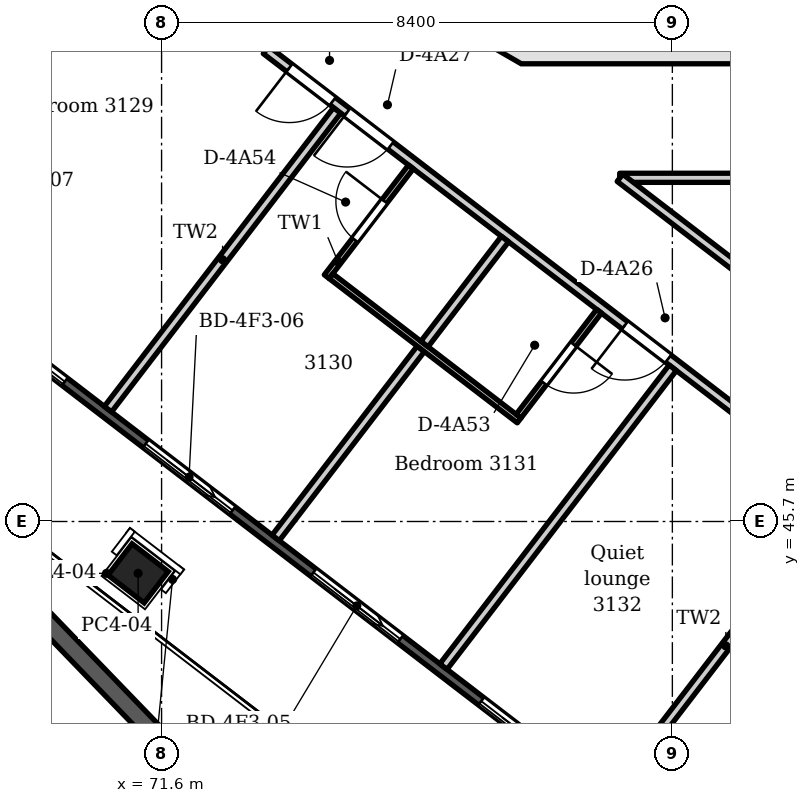
"""IFC4 building model, lengths in metres.
Left out: names, types, materials, properties, quantities, classifications, styles, units other than length and angle.
Written with IfcOpenShell. Run it as: python <this file> out.ifc"""

import sys

from ifc_helpers import new_model, si_unit, direction, frame, frame_2d, origin, origin_2d, place, context, subcontext, project, spatial, polyline, rectangle, outline, extrude, element, fill, save


model = new_model("IFC4")
c1 = context("Model", 3, precision=1e-05, world=origin(), true_north=direction((0.0, 1.0)))
c2 = subcontext(c1, "Body", "Model", "MODEL_VIEW")
j1 = project(units=[si_unit("LENGTHUNIT", "METRE"), si_unit("PLANEANGLEUNIT", "RADIAN")], contexts=[c1])
p1 = place(None, origin())
s1 = spatial("IfcSite", under=j1, at=p1, CompositionType="ELEMENT")
p2 = place(p1, origin())
s2 = spatial("IfcBuilding", under=s1, at=p2, CompositionType="ELEMENT")
p3 = place(p2, frame((0.0, 0.0, 124.2)))
s3 = spatial("IfcBuildingStorey", under=s2, at=p3, CompositionType="ELEMENT", Elevation=124.2)
p4 = place(p3, frame((73.437, 56.102, 0.0), z_axis=(0.0, 0.0, 1.0), x_axis=(0.866003133579, -0.500038571144, 0.0)))
e1 = element("IfcWall", 1, at=p4, inside=s3, PredefinedType="SHEAR", context=c2, shape_type="SweptSolid", body=[
    extrude(outline(polyline([(0.0, -0.45), (4.969, -0.45), (4.728, 0.45), (0.241, 0.45), (0.0, -0.45)])), origin(), (0.0, 0.0, 1.0), 3.6),
])
p5 = place(p4, frame((0.896, 0.0, 0.0)))
e2 = element("IfcOpeningElement", 2, at=p5, cuts=e1, PredefinedType="OPENING", context=c2, shape_type="SweptSolid", body=[
    extrude(rectangle(XDim=0.9, YDim=2.1, at=frame_2d((0.45, 1.05))), frame((0.0, 0.46, 0.0), z_axis=(0.0, -1.0, 0.0), x_axis=(1.0, 0.0, 0.0)), (0.0, 0.0, 1.0), 0.92),
])
p6 = place(p4, frame((3.185, 0.0, 0.0)))
e3 = element("IfcOpeningElement", 3, at=p6, cuts=e1, PredefinedType="OPENING", context=c2, shape_type="SweptSolid", body=[
    extrude(rectangle(XDim=0.9, YDim=2.1, at=frame_2d((0.45, 1.05))), frame((0.0, 0.46, 0.0), z_axis=(0.0, -1.0, 0.0), x_axis=(1.0, 0.0, 0.0)), (0.0, 0.0, 1.0), 0.92),
])
p7 = place(p3, frame((77.515, 53.677, 0.0), z_axis=(0.0, 0.0, 1.0), x_axis=(1.0, 0.0, 0.0)))
e4 = element("IfcWall", 4, at=p7, inside=s3, PredefinedType="SHEAR", context=c2, shape_type="SweptSolid", body=[
    extrude(outline(polyline([(0.0, -0.45), (4.969, -0.45), (4.728, 0.45), (0.241, 0.45), (0.0, -0.45)])), origin(), (0.0, 0.0, 1.0), 3.6),
])
p8 = place(p7, frame((1.485, 0.0, 0.0)))
e5 = element("IfcOpeningElement", 5, at=p8, cuts=e4, PredefinedType="OPENING", context=c2, shape_type="SweptSolid", body=[
    extrude(rectangle(XDim=2.0, YDim=2.1, at=frame_2d((1.0, 1.05))), frame((0.0, 0.46, 0.0), z_axis=(0.0, -1.0, 0.0), x_axis=(1.0, 0.0, 0.0)), (0.0, 0.0, 1.0), 0.92),
])
p9 = place(p3, frame((71.214, 44.847, -0.35), z_axis=(0.0, 0.0, 1.0), x_axis=(-0.793353340291, 0.608761429009, 0.0)))
e6 = element("IfcColumn", 6, at=p9, inside=s3, PredefinedType="COLUMN", context=c2, shape_type="SweptSolid", body=[
    extrude(rectangle(XDim=0.75, YDim=0.65, at=origin_2d()), origin(), (0.0, 0.0, 1.0), 3.95),
])
p10 = place(p3, frame((87.225, 34.786, 0.0), z_axis=(0.0, 0.0, 1.0), x_axis=(-0.793353605974, 0.608761082764, 0.0)))
e7 = element("IfcWall", 7, at=p10, inside=s3, PredefinedType="SOLIDWALL", context=c2, shape_type="SweptSolid", body=[
    extrude(outline(polyline([(0.149, 0.075), (0.149, -0.075), (45.057, -0.075), (45.057, 0.075), (0.149, 0.075)])), origin(), (0.0, 0.0, 1.0), 3.3),
])
p11 = place(p10, frame((1.239, 0.0, 0.0)))
e8 = element("IfcOpeningElement", 8, at=p11, cuts=e7, PredefinedType="OPENING", context=c2, shape_type="SweptSolid", body=[
    extrude(rectangle(XDim=1.8, YDim=2.6, at=frame_2d((0.9, 1.3))), frame((0.0, 0.085, 0.0), z_axis=(0.0, -1.0, 0.0), x_axis=(1.0, 0.0, 0.0)), (0.0, 0.0, 1.0), 0.17),
])
p12 = place(p10, frame((4.316, 0.0, 0.0)))
e9 = element("IfcOpeningElement", 9, at=p12, cuts=e7, PredefinedType="OPENING", context=c2, shape_type="SweptSolid", body=[
    extrude(rectangle(XDim=1.8, YDim=2.6, at=frame_2d((0.9, 1.3))), frame((0.0, 0.085, 0.0), z_axis=(0.0, -1.0, 0.0), x_axis=(1.0, 0.0, 0.0)), (0.0, 0.0, 1.0), 0.17),
])
p13 = place(p10, frame((7.793, 0.0, 0.0)))
e10 = element("IfcOpeningElement", 10, at=p13, cuts=e7, PredefinedType="OPENING", context=c2, shape_type="SweptSolid", body=[
    extrude(rectangle(XDim=1.8, YDim=2.6, at=frame_2d((0.9, 1.3))), frame((0.0, 0.085, 0.0), z_axis=(0.0, -1.0, 0.0), x_axis=(1.0, 0.0, 0.0)), (0.0, 0.0, 1.0), 0.17),
])
p14 = place(p10, frame((11.271, 0.0, 0.0)))
e11 = element("IfcOpeningElement", 11, at=p14, cuts=e7, PredefinedType="OPENING", context=c2, shape_type="SweptSolid", body=[
    extrude(rectangle(XDim=1.8, YDim=2.6, at=frame_2d((0.9, 1.3))), frame((0.0, 0.085, 0.0), z_axis=(0.0, -1.0, 0.0), x_axis=(1.0, 0.0, 0.0)), (0.0, 0.0, 1.0), 0.17),
])
p15 = place(p10, frame((14.748, 0.0, 0.0)))
e12 = element("IfcOpeningElement", 12, at=p15, cuts=e7, PredefinedType="OPENING", context=c2, shape_type="SweptSolid", body=[
    extrude(rectangle(XDim=1.8, YDim=2.6, at=frame_2d((0.9, 1.3))), frame((0.0, 0.085, 0.0), z_axis=(0.0, -1.0, 0.0), x_axis=(1.0, 0.0, 0.0)), (0.0, 0.0, 1.0), 0.17),
])
p16 = place(p10, frame((18.226, 0.0, 0.0)))
e13 = element("IfcOpeningElement", 13, at=p16, cuts=e7, PredefinedType="OPENING", context=c2, shape_type="SweptSolid", body=[
    extrude(rectangle(XDim=1.8, YDim=2.6, at=frame_2d((0.9, 1.3))), frame((0.0, 0.085, 0.0), z_axis=(0.0, -1.0, 0.0), x_axis=(1.0, 0.0, 0.0)), (0.0, 0.0, 1.0), 0.17),
])
p17 = place(p10, frame((21.703, 0.0, 0.0)))
e14 = element("IfcOpeningElement", 14, at=p17, cuts=e7, PredefinedType="OPENING", context=c2, shape_type="SweptSolid", body=[
    extrude(rectangle(XDim=1.8, YDim=2.6, at=frame_2d((0.9, 1.3))), frame((0.0, 0.085, 0.0), z_axis=(0.0, -1.0, 0.0), x_axis=(1.0, 0.0, 0.0)), (0.0, 0.0, 1.0), 0.17),
])
p18 = place(p10, frame((25.18, 0.0, 0.0)))
e15 = element("IfcOpeningElement", 15, at=p18, cuts=e7, PredefinedType="OPENING", context=c2, shape_type="SweptSolid", body=[
    extrude(rectangle(XDim=1.8, YDim=2.6, at=frame_2d((0.9, 1.3))), frame((0.0, 0.085, 0.0), z_axis=(0.0, -1.0, 0.0), x_axis=(1.0, 0.0, 0.0)), (0.0, 0.0, 1.0), 0.17),
])
p19 = place(p10, frame((28.658, 0.0, 0.0)))
e16 = element("IfcOpeningElement", 16, at=p19, cuts=e7, PredefinedType="OPENING", context=c2, shape_type="SweptSolid", body=[
    extrude(rectangle(XDim=1.8, YDim=2.6, at=frame_2d((0.9, 1.3))), frame((0.0, 0.085, 0.0), z_axis=(0.0, -1.0, 0.0), x_axis=(1.0, 0.0, 0.0)), (0.0, 0.0, 1.0), 0.17),
])
p20 = place(p10, frame((32.135, 0.0, 0.0)))
e17 = element("IfcOpeningElement", 17, at=p20, cuts=e7, PredefinedType="OPENING", context=c2, shape_type="SweptSolid", body=[
    extrude(rectangle(XDim=1.8, YDim=2.6, at=frame_2d((0.9, 1.3))), frame((0.0, 0.085, 0.0), z_axis=(0.0, -1.0, 0.0), x_axis=(1.0, 0.0, 0.0)), (0.0, 0.0, 1.0), 0.17),
])
p21 = place(p10, frame((35.613, 0.0, 0.0)))
e18 = element("IfcOpeningElement", 18, at=p21, cuts=e7, PredefinedType="OPENING", context=c2, shape_type="SweptSolid", body=[
    extrude(rectangle(XDim=1.8, YDim=2.6, at=frame_2d((0.9, 1.3))), frame((0.0, 0.085, 0.0), z_axis=(0.0, -1.0, 0.0), x_axis=(1.0, 0.0, 0.0)), (0.0, 0.0, 1.0), 0.17),
])
p22 = place(p10, frame((39.09, 0.0, 0.0)))
e19 = element("IfcOpeningElement", 19, at=p22, cuts=e7, PredefinedType="OPENING", context=c2, shape_type="SweptSolid", body=[
    extrude(rectangle(XDim=1.8, YDim=2.6, at=frame_2d((0.9, 1.3))), frame((0.0, 0.085, 0.0), z_axis=(0.0, -1.0, 0.0), x_axis=(1.0, 0.0, 0.0)), (0.0, 0.0, 1.0), 0.17),
])
p23 = place(p10, frame((42.167, 0.0, 0.0)))
e20 = element("IfcOpeningElement", 20, at=p23, cuts=e7, PredefinedType="OPENING", context=c2, shape_type="SweptSolid", body=[
    extrude(rectangle(XDim=1.8, YDim=2.6, at=frame_2d((0.9, 1.3))), frame((0.0, 0.085, 0.0), z_axis=(0.0, -1.0, 0.0), x_axis=(1.0, 0.0, 0.0)), (0.0, 0.0, 1.0), 0.17),
])
p24 = place(p3, origin())
e21 = element("IfcWall", 21, at=p24, inside=s3, PredefinedType="PARAPET", context=c2, shape_type="SweptSolid", body=[
    extrude(outline(polyline([(64.446, 49.285), (85.042, 27.956), (85.138, 28.289), (66.056, 48.049), (64.446, 49.285)])), origin(), (0.0, 0.0, 1.0), 1.1),
])
p25 = place(p3, frame((70.718, 47.548, 0.0), z_axis=(0.0, 0.0, 1.0), x_axis=(0.608712047114, 0.79339122991, 0.0)))
e22 = element("IfcWall", 22, at=p25, inside=s3, PredefinedType="PARTITIONING", context=c2, shape_type="SweptSolid", body=[
    extrude(rectangle(XDim=6.193, YDim=0.15, at=frame_2d((3.097, 0.0))), origin(), (0.0, 0.0, 1.0), 3.3),
])
p26 = place(p3, frame((73.318, 53.454, 0.0), z_axis=(0.0, 0.0, 1.0), x_axis=(0.793337765411, -0.60878172605, 0.0)))
e23 = element("IfcWall", 23, at=p26, inside=s3, PredefinedType="PARTITIONING", context=c2, shape_type="SweptSolid", body=[
    extrude(rectangle(XDim=18.995, YDim=0.15, at=frame_2d((9.498, 0.0))), origin(), (0.0, 0.0, 1.0), 2.8),
])
p27 = place(p26, frame((14.393, 0.0, 0.0)))
e24 = element("IfcOpeningElement", 24, at=p27, cuts=e23, PredefinedType="OPENING", context=c2, shape_type="SweptSolid", body=[
    extrude(rectangle(XDim=0.9, YDim=2.1, at=frame_2d((0.45, 1.05))), frame((0.0, 0.085, 0.0), z_axis=(0.0, -1.0, 0.0), x_axis=(1.0, 0.0, 0.0)), (0.0, 0.0, 1.0), 0.17),
])
p28 = place(p26, frame((10.523, 0.0, 0.0)))
e25 = element("IfcOpeningElement", 25, at=p28, cuts=e23, PredefinedType="OPENING", context=c2, shape_type="SweptSolid", body=[
    extrude(rectangle(XDim=1.0, YDim=2.1, at=frame_2d((0.5, 1.05))), frame((0.0, 0.085, 0.0), z_axis=(0.0, -1.0, 0.0), x_axis=(1.0, 0.0, 0.0)), (0.0, 0.0, 1.0), 0.17),
])
p29 = place(p26, frame((7.438, 0.0, 0.0)))
e26 = element("IfcOpeningElement", 26, at=p29, cuts=e23, PredefinedType="OPENING", context=c2, shape_type="SweptSolid", body=[
    extrude(rectangle(XDim=0.9, YDim=2.1, at=frame_2d((0.45, 1.05))), frame((0.0, 0.085, 0.0), z_axis=(0.0, -1.0, 0.0), x_axis=(1.0, 0.0, 0.0)), (0.0, 0.0, 1.0), 0.17),
])
p30 = place(p26, frame((1.683, 0.0, 0.0)))
e27 = element("IfcOpeningElement", 27, at=p30, cuts=e23, PredefinedType="OPENING", context=c2, shape_type="SweptSolid", body=[
    extrude(rectangle(XDim=0.9, YDim=2.1, at=frame_2d((0.45, 1.05))), frame((0.0, 0.085, 0.0), z_axis=(0.0, -1.0, 0.0), x_axis=(1.0, 0.0, 0.0)), (0.0, 0.0, 1.0), 0.17),
])
p31 = place(p26, frame((0.483, 0.0, 0.0)))
e28 = element("IfcOpeningElement", 28, at=p31, cuts=e23, PredefinedType="OPENING", context=c2, shape_type="SweptSolid", body=[
    extrude(rectangle(XDim=0.9, YDim=2.1, at=frame_2d((0.45, 1.05))), frame((0.0, 0.085, 0.0), z_axis=(0.0, -1.0, 0.0), x_axis=(1.0, 0.0, 0.0)), (0.0, 0.0, 1.0), 0.17),
])
p32 = place(p3, frame((73.476, 45.431, 0.0), z_axis=(0.0, 0.0, 1.0), x_axis=(0.608903577747, 0.793244245493, 0.0)))
e29 = element("IfcWall", 29, at=p32, inside=s3, PredefinedType="PARTITIONING", context=c2, shape_type="SweptSolid", body=[
    extrude(rectangle(XDim=3.919, YDim=0.15, at=frame_2d((1.959, 0.0))), origin(), (0.0, 0.0, 1.0), 3.3),
])
p33 = place(p3, frame((74.316, 49.726, 0.0), z_axis=(0.0, 0.0, 1.0), x_axis=(0.608652294224, 0.793437070432, 0.0)))
e30 = element("IfcWall", 30, at=p33, inside=s3, PredefinedType="PARTITIONING", context=c2, shape_type="SweptSolid", body=[
    extrude(rectangle(XDim=2.275, YDim=0.1, at=frame_2d((1.138, 0.0))), origin(), (0.0, 0.0, 1.0), 3.3),
])
p34 = place(p33, frame((0.762, 0.0, 0.0)))
e31 = element("IfcOpeningElement", 31, at=p34, cuts=e30, PredefinedType="OPENING", context=c2, shape_type="SweptSolid", body=[
    extrude(rectangle(XDim=0.8, YDim=2.1, at=frame_2d((0.4, 1.05))), frame((0.0, 0.06, 0.0), z_axis=(0.0, -1.0, 0.0), x_axis=(1.0, 0.0, 0.0)), (0.0, 0.0, 1.0), 0.12),
])
p35 = place(p3, frame((74.386, 49.736, 0.0), z_axis=(0.0, 0.0, 1.0), x_axis=(0.793363466367, -0.608748232222, 0.0)))
e32 = element("IfcWall", 32, at=p35, inside=s3, PredefinedType="PARTITIONING", context=c2, shape_type="SweptSolid", body=[
    extrude(rectangle(XDim=3.9, YDim=0.1, at=frame_2d((1.95, 0.0))), origin(), (0.0, 0.0, 1.0), 3.3),
])
p36 = place(p3, frame((75.923, 48.619, 0.0), z_axis=(0.0, 0.0, 1.0), x_axis=(0.608674216197, 0.79342025342, 0.0)))
e33 = element("IfcWall", 33, at=p36, inside=s3, PredefinedType="PARTITIONING", context=c2, shape_type="SweptSolid", body=[
    extrude(rectangle(XDim=2.175, YDim=0.15, at=frame_2d((1.088, 0.0))), origin(), (0.0, 0.0, 1.0), 3.3),
])
p37 = place(p3, frame((76.235, 43.314, 0.0), z_axis=(0.0, 0.0, 1.0), x_axis=(0.608811285709, 0.79331508141, 0.0)))
e34 = element("IfcWall", 34, at=p37, inside=s3, PredefinedType="PARTITIONING", context=c2, shape_type="SweptSolid", body=[
    extrude(rectangle(XDim=6.194, YDim=0.15, at=frame_2d((3.097, 0.0))), origin(), (0.0, 0.0, 1.0), 3.3),
])
p38 = place(p3, frame((77.47, 47.432, 0.0), z_axis=(0.0, 0.0, 1.0), x_axis=(0.608674216197, 0.79342025342, 0.0)))
e35 = element("IfcWall", 35, at=p38, inside=s3, PredefinedType="PARTITIONING", context=c2, shape_type="SweptSolid", body=[
    extrude(rectangle(XDim=2.175, YDim=0.1, at=frame_2d((1.088, 0.0))), origin(), (0.0, 0.0, 1.0), 3.3),
])
p39 = place(p38, frame((0.688, 0.0, 0.0)))
e36 = element("IfcOpeningElement", 36, at=p39, cuts=e35, PredefinedType="OPENING", context=c2, shape_type="SweptSolid", body=[
    extrude(rectangle(XDim=0.8, YDim=2.1, at=frame_2d((0.4, 1.05))), frame((0.0, 0.06, 0.0), z_axis=(0.0, -1.0, 0.0), x_axis=(1.0, 0.0, 0.0)), (0.0, 0.0, 1.0), 0.12),
])
p40 = place(p3, frame((78.994, 41.197, 0.0), z_axis=(0.0, 0.0, 1.0), x_axis=(0.608811285709, 0.79331508141, 0.0)))
e37 = element("IfcWall", 37, at=p40, inside=s3, PredefinedType="PARTITIONING", context=c2, shape_type="SweptSolid", body=[
    extrude(rectangle(XDim=6.194, YDim=0.15, at=frame_2d((3.097, 0.0))), origin(), (0.0, 0.0, 1.0), 3.3),
])
p41 = place(p3, frame((79.134, 51.352, 0.0), z_axis=(0.0, 0.0, 1.0), x_axis=(1.0, 0.0, 0.0)))
e38 = element("IfcWall", 38, at=p41, inside=s3, PredefinedType="PARTITIONING", context=c2, shape_type="SweptSolid", body=[
    extrude(rectangle(XDim=3.928, YDim=0.15, at=frame_2d((1.964, 0.0))), origin(), (0.0, 0.0, 1.0), 3.3),
])
p42 = place(p3, frame((79.138, 51.352, 0.0), z_axis=(0.0, 0.0, 1.0), x_axis=(0.793274409151, -0.608864280268, 0.0)))
e39 = element("IfcWall", 39, at=p42, inside=s3, PredefinedType="PARTITIONING", context=c2, shape_type="SweptSolid", body=[
    extrude(rectangle(XDim=5.341, YDim=0.15, at=frame_2d((2.67, 0.0))), origin(), (0.0, 0.0, 1.0), 3.3),
])
p43 = place(p14, origin())
e40 = element("IfcDoor", 40, at=p43, inside=s3, OperationType="SLIDING_TO_LEFT", PredefinedType="DOOR", context=c2, shape_type="SweptSolid", body=[
    extrude(rectangle(XDim=1.8, YDim=2.6, at=frame_2d((0.9, 1.3))), frame((0.0, 0.025, 0.0), z_axis=(0.0, -1.0, 0.0), x_axis=(1.0, 0.0, 0.0)), (0.0, 0.0, 1.0), 0.05),
])
fill(e11, e40)
p44 = place(p15, origin())
e41 = element("IfcDoor", 41, at=p44, inside=s3, OperationType="SLIDING_TO_LEFT", PredefinedType="DOOR", context=c2, shape_type="SweptSolid", body=[
    extrude(rectangle(XDim=1.8, YDim=2.6, at=frame_2d((0.9, 1.3))), frame((0.0, 0.025, 0.0), z_axis=(0.0, -1.0, 0.0), x_axis=(1.0, 0.0, 0.0)), (0.0, 0.0, 1.0), 0.05),
])
fill(e12, e41)
p45 = place(p16, origin())
e42 = element("IfcDoor", 42, at=p45, inside=s3, OperationType="SLIDING_TO_LEFT", PredefinedType="DOOR", context=c2, shape_type="SweptSolid", body=[
    extrude(rectangle(XDim=1.8, YDim=2.6, at=frame_2d((0.9, 1.3))), frame((0.0, 0.025, 0.0), z_axis=(0.0, -1.0, 0.0), x_axis=(1.0, 0.0, 0.0)), (0.0, 0.0, 1.0), 0.05),
])
fill(e13, e42)
p46 = place(p17, origin())
e43 = element("IfcDoor", 43, at=p46, inside=s3, OperationType="SLIDING_TO_LEFT", PredefinedType="DOOR", context=c2, shape_type="SweptSolid", body=[
    extrude(rectangle(XDim=1.8, YDim=2.6, at=frame_2d((0.9, 1.3))), frame((0.0, 0.025, 0.0), z_axis=(0.0, -1.0, 0.0), x_axis=(1.0, 0.0, 0.0)), (0.0, 0.0, 1.0), 0.05),
])
fill(e14, e43)
p47 = place(p29, frame((0.9, 0.0, 0.0), z_axis=(0.0, 0.0, 1.0), x_axis=(-1.0, 0.0, 0.0)))
e44 = element("IfcDoor", 44, at=p47, inside=s3, OperationType="SINGLE_SWING_RIGHT", PredefinedType="DOOR", context=c2, shape_type="SweptSolid", body=[
    extrude(rectangle(XDim=0.9, YDim=2.1, at=frame_2d((0.45, 1.05))), frame((0.0, 0.025, 0.0), z_axis=(0.0, -1.0, 0.0), x_axis=(1.0, 0.0, 0.0)), (0.0, 0.0, 1.0), 0.05),
])
fill(e26, e44)
p48 = place(p30, frame((0.9, 0.0, 0.0), z_axis=(0.0, 0.0, 1.0), x_axis=(-1.0, 0.0, 0.0)))
e45 = element("IfcDoor", 45, at=p48, inside=s3, OperationType="SINGLE_SWING_RIGHT", PredefinedType="DOOR", context=c2, shape_type="SweptSolid", body=[
    extrude(rectangle(XDim=0.9, YDim=2.1, at=frame_2d((0.45, 1.05))), frame((0.0, 0.025, 0.0), z_axis=(0.0, -1.0, 0.0), x_axis=(1.0, 0.0, 0.0)), (0.0, 0.0, 1.0), 0.05),
])
fill(e27, e45)
p49 = place(p31, frame((0.9, 0.0, 0.0), z_axis=(0.0, 0.0, 1.0), x_axis=(-1.0, 0.0, 0.0)))
e46 = element("IfcDoor", 46, at=p49, inside=s3, OperationType="SINGLE_SWING_RIGHT", PredefinedType="DOOR", context=c2, shape_type="SweptSolid", body=[
    extrude(rectangle(XDim=0.9, YDim=2.1, at=frame_2d((0.45, 1.05))), frame((0.0, 0.025, 0.0), z_axis=(0.0, -1.0, 0.0), x_axis=(1.0, 0.0, 0.0)), (0.0, 0.0, 1.0), 0.05),
])
fill(e28, e46)
p50 = place(p39, frame((0.8, 0.0, 0.0), z_axis=(0.0, 0.0, 1.0), x_axis=(-1.0, 0.0, 0.0)))
e47 = element("IfcDoor", 47, at=p50, inside=s3, OperationType="SINGLE_SWING_LEFT", PredefinedType="DOOR", context=c2, shape_type="SweptSolid", body=[
    extrude(rectangle(XDim=0.8, YDim=2.1, at=frame_2d((0.4, 1.05))), frame((0.0, 0.025, 0.0), z_axis=(0.0, -1.0, 0.0), x_axis=(1.0, 0.0, 0.0)), (0.0, 0.0, 1.0), 0.05),
])
fill(e36, e47)
p51 = place(p34, origin())
e48 = element("IfcDoor", 48, at=p51, inside=s3, OperationType="SINGLE_SWING_RIGHT", PredefinedType="DOOR", context=c2, shape_type="SweptSolid", body=[
    extrude(rectangle(XDim=0.8, YDim=2.1, at=frame_2d((0.4, 1.05))), frame((0.0, 0.025, 0.0), z_axis=(0.0, -1.0, 0.0), x_axis=(1.0, 0.0, 0.0)), (0.0, 0.0, 1.0), 0.05),
])
fill(e31, e48)
save(model, sys.argv[1])
